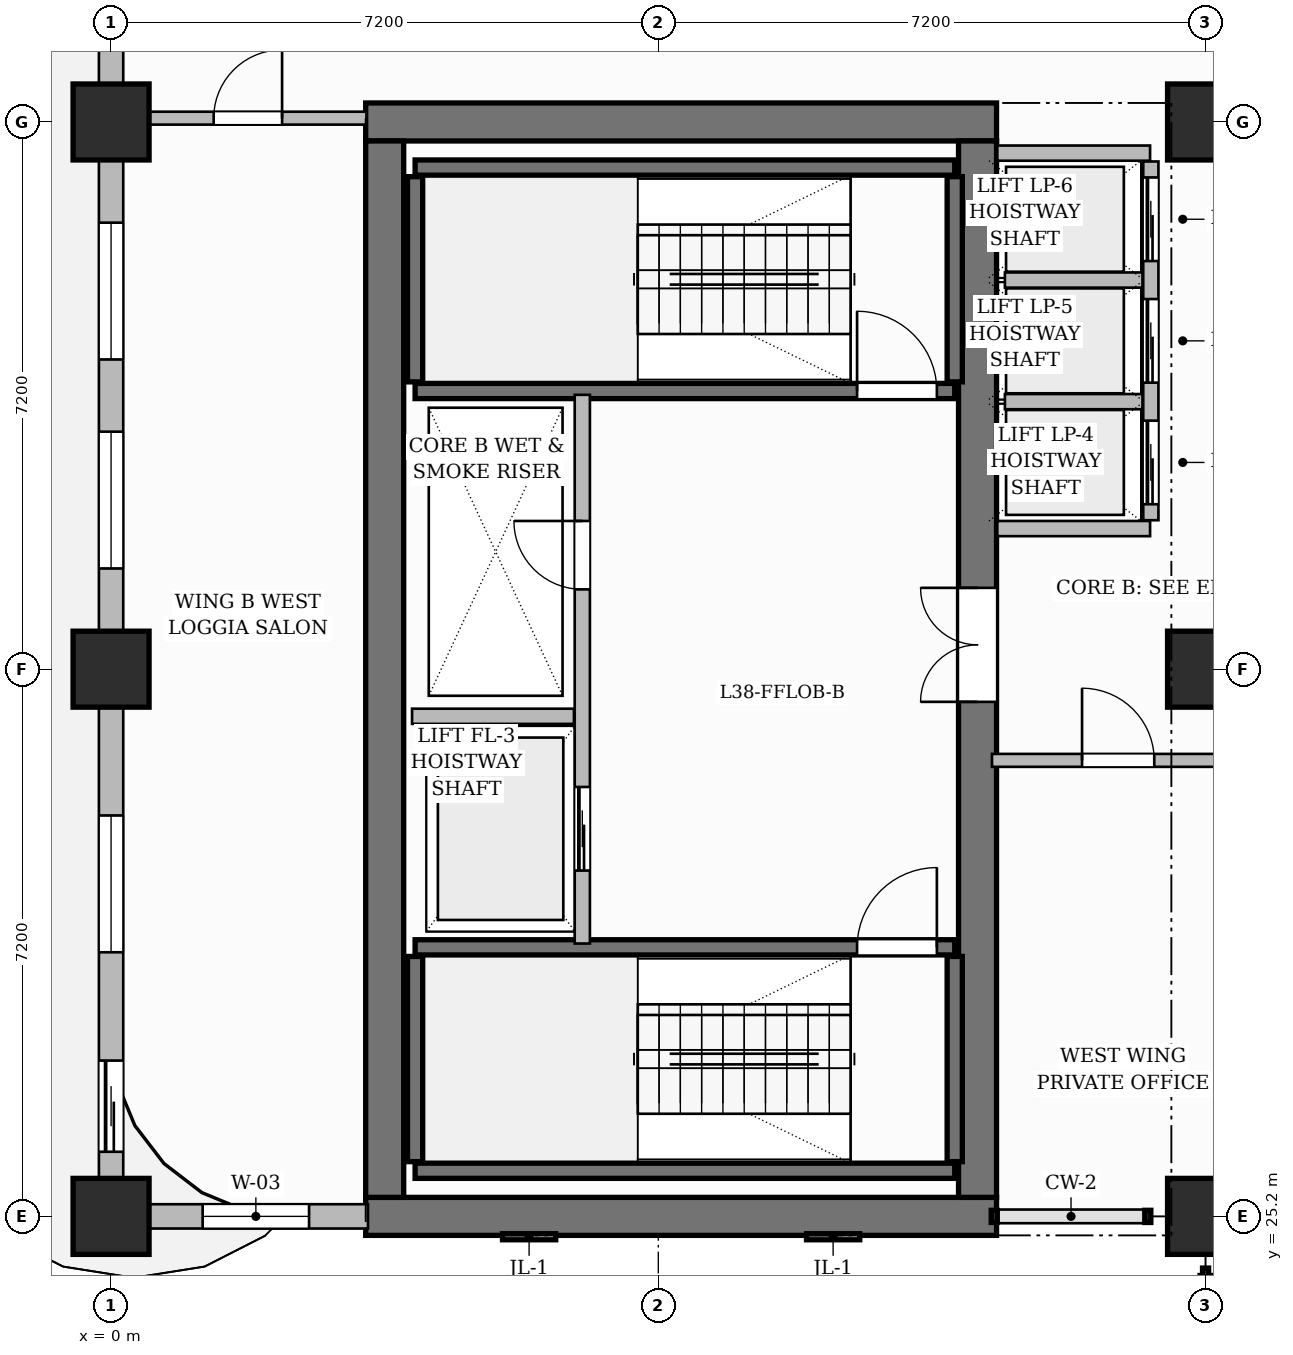
"""IFC4 building model, lengths in metres.
Left out: names, types, materials, properties, quantities, classifications, styles, units other than length and angle.
Written with IfcOpenShell. Run it as: python <this file> out.ifc"""

import sys

from ifc_helpers import new_model, si_unit, direction, frame, frame_2d, origin, origin_2d, place, context, subcontext, project, spatial, rectangle, extrude, source, transform, mapped, element, fill, save


model = new_model("IFC4")
c1 = context("Model", 3, precision=1e-05, world=origin(), true_north=direction((0.0, 1.0)))
c2 = subcontext(c1, "Body", "Model", "MODEL_VIEW")
j1 = project(units=[si_unit("LENGTHUNIT", "METRE"), si_unit("PLANEANGLEUNIT", "RADIAN")], contexts=[c1])
p1 = place(None, origin())
s1 = spatial("IfcSite", under=j1, at=p1, CompositionType="ELEMENT")
p2 = place(p1, origin())
s2 = spatial("IfcBuilding", under=s1, at=p2, CompositionType="ELEMENT")
p3 = place(p2, frame((0.0, 0.0, 154.15)))
s3 = spatial("IfcBuildingStorey", under=s2, at=p3, CompositionType="ELEMENT", Elevation=154.15)
for number, where, z_axis, x_axis in (
    (1, (3.35, 25.2, 0.0), (0.0, 0.0, 1.0), (1.0, 0.0, 0.0)),
    (2, (3.35, 39.6, 0.0), (0.0, 0.0, 1.0), (1.0, 0.0, 0.0)),
):
    element("IfcWall", number, at=place(p3, frame(where, z_axis=z_axis, x_axis=x_axis)), inside=s3, PredefinedType="SHEAR", context=c2, shape_type="SweptSolid", body=[
        extrude(rectangle(XDim=8.3, YDim=0.5, at=frame_2d((4.15, 0.0))), origin(), (0.0, 0.0, 1.0), 3.85),
    ])
p4 = place(p3, frame((3.6, 25.45, 0.0), z_axis=(0.0, 0.0, 1.0), x_axis=(0.0, 1.0, 0.0)))
e3 = element("IfcWall", 3, at=p4, inside=s3, PredefinedType="SHEAR", context=c2, shape_type="SweptSolid", body=[
    extrude(rectangle(XDim=13.9, YDim=0.5, at=frame_2d((6.95, 0.0))), origin(), (0.0, 0.0, 1.0), 3.85),
])
p5 = place(p3, frame((11.4, 25.45, 0.0), z_axis=(0.0, 0.0, 1.0), x_axis=(0.0, 1.0, 0.0)))
e4 = element("IfcWall", 4, at=p5, inside=s3, PredefinedType="SHEAR", context=c2, shape_type="SweptSolid", body=[
    extrude(rectangle(XDim=13.9, YDim=0.5, at=frame_2d((6.95, 0.0))), origin(), (0.0, 0.0, 1.0), 3.85),
])
p6 = place(p5, frame((6.52, 0.0, 0.0)))
e5 = element("IfcOpeningElement", 5, at=p6, cuts=e4, PredefinedType="OPENING", context=c2, shape_type="SweptSolid", body=[
    extrude(rectangle(XDim=1.5, YDim=2.2, at=frame_2d((0.75, 1.1))), frame((0.0, 0.26, 0.0), z_axis=(0.0, -1.0, 0.0), x_axis=(1.0, 0.0, 0.0)), (0.0, 0.0, 1.0), 0.52),
])
m1 = source(origin(), c2, "Body", "SweptSolid", [
    extrude(rectangle(XDim=1.0, YDim=1.0, at=origin_2d()), origin(), (0.0, 0.0, 1.0), 3.85),
])
for number, where, z_axis, x_axis in (
    (6, (0.0, 25.2, 0.0), (0.0, 0.0, 1.0), (1.0, 0.0, 0.0)),
    (7, (0.0, 32.4, 0.0), (0.0, 0.0, 1.0), (1.0, 0.0, 0.0)),
    (8, (0.0, 39.6, 0.0), (0.0, 0.0, 1.0), (1.0, 0.0, 0.0)),
    (9, (14.4, 25.2, 0.0), (0.0, 0.0, 1.0), (1.0, 0.0, 0.0)),
    (10, (14.4, 32.4, 0.0), (0.0, 0.0, 1.0), (1.0, 0.0, 0.0)),
    (11, (14.4, 39.6, 0.0), (0.0, 0.0, 1.0), (1.0, 0.0, 0.0)),
):
    element("IfcColumn", number, at=place(p3, frame(where, z_axis=z_axis, x_axis=x_axis)), inside=s3, PredefinedType="COLUMN", context=c2, shape_type="MappedRepresentation", body=[
        mapped(m1, transform((0.0, 0.0, 0.0), scale=1.0)),
    ])
p7 = place(p3, frame((4.0, 25.8, 0.0), z_axis=(0.0, 0.0, 1.0), x_axis=(1.0, 0.0, 0.0)))
e12 = element("IfcWall", 12, at=p7, inside=s3, PredefinedType="SHEAR", context=c2, shape_type="SweptSolid", body=[
    extrude(rectangle(XDim=7.1, YDim=0.2, at=frame_2d((3.55, 0.0))), origin(), (0.0, 0.0, 1.0), 3.85),
])
for number, where, z_axis, x_axis in (
    (13, (4.0, 25.92, 0.0), (0.0, 0.0, 1.0), (0.0, 1.0, 0.0)),
    (14, (11.1, 25.92, 0.0), (0.0, 0.0, 1.0), (0.0, 1.0, 0.0)),
):
    element("IfcWall", number, at=place(p3, frame(where, z_axis=z_axis, x_axis=x_axis)), inside=s3, PredefinedType="SHEAR", context=c2, shape_type="SweptSolid", body=[
        extrude(rectangle(XDim=2.7, YDim=0.2, at=frame_2d((1.35, 0.0))), origin(), (0.0, 0.0, 1.0), 3.85),
    ])
p8 = place(p3, frame((4.0, 28.74, 0.0), z_axis=(0.0, 0.0, 1.0), x_axis=(1.0, 0.0, 0.0)))
e15 = element("IfcWall", 15, at=p8, inside=s3, PredefinedType="SHEAR", context=c2, shape_type="SweptSolid", body=[
    extrude(rectangle(XDim=7.1, YDim=0.2, at=frame_2d((3.55, 0.0))), origin(), (0.0, 0.0, 1.0), 3.85),
])
p9 = place(p8, frame((5.815, 0.0, 0.0)))
e16 = element("IfcOpeningElement", 16, at=p9, cuts=e15, PredefinedType="OPENING", context=c2, shape_type="SweptSolid", body=[
    extrude(rectangle(XDim=1.05, YDim=2.2, at=frame_2d((0.525, 1.1))), frame((0.0, 0.11, 0.0), z_axis=(0.0, -1.0, 0.0), x_axis=(1.0, 0.0, 0.0)), (0.0, 0.0, 1.0), 0.22),
])
p10 = place(p3, frame((4.0, 39.0, 0.0), z_axis=(0.0, 0.0, 1.0), x_axis=(1.0, 0.0, 0.0)))
e17 = element("IfcWall", 17, at=p10, inside=s3, PredefinedType="SHEAR", context=c2, shape_type="SweptSolid", body=[
    extrude(rectangle(XDim=7.1, YDim=0.2, at=frame_2d((3.55, 0.0))), origin(), (0.0, 0.0, 1.0), 3.85),
])
for number, where, z_axis, x_axis in (
    (18, (4.0, 36.18, 0.0), (0.0, 0.0, 1.0), (0.0, 1.0, 0.0)),
    (19, (11.1, 36.18, 0.0), (0.0, 0.0, 1.0), (0.0, 1.0, 0.0)),
):
    element("IfcWall", number, at=place(p3, frame(where, z_axis=z_axis, x_axis=x_axis)), inside=s3, PredefinedType="SHEAR", context=c2, shape_type="SweptSolid", body=[
        extrude(rectangle(XDim=2.7, YDim=0.2, at=frame_2d((1.35, 0.0))), origin(), (0.0, 0.0, 1.0), 3.85),
    ])
p11 = place(p3, frame((4.0, 36.06, 0.0), z_axis=(0.0, 0.0, 1.0), x_axis=(1.0, 0.0, 0.0)))
e20 = element("IfcWall", 20, at=p11, inside=s3, PredefinedType="SHEAR", context=c2, shape_type="SweptSolid", body=[
    extrude(rectangle(XDim=7.1, YDim=0.2, at=frame_2d((3.55, 0.0))), origin(), (0.0, 0.0, 1.0), 3.85),
])
p12 = place(p11, frame((5.815, 0.0, 0.0)))
e21 = element("IfcOpeningElement", 21, at=p12, cuts=e20, PredefinedType="OPENING", context=c2, shape_type="SweptSolid", body=[
    extrude(rectangle(XDim=1.05, YDim=2.2, at=frame_2d((0.525, 1.1))), frame((0.0, 0.11, 0.0), z_axis=(0.0, -1.0, 0.0), x_axis=(1.0, 0.0, 0.0)), (0.0, 0.0, 1.0), 0.22),
])
p13 = place(p3, frame((6.2, 28.79, 0.0), z_axis=(0.0, 0.0, 1.0), x_axis=(0.0, 1.0, 0.0)))
e22 = element("IfcWall", 22, at=p13, inside=s3, PredefinedType="PARTITIONING", context=c2, shape_type="SweptSolid", body=[
    extrude(rectangle(XDim=7.22, YDim=0.2, at=frame_2d((3.61, 0.0))), origin(), (0.0, 0.0, 1.0), 3.6),
])
p14 = place(p13, frame((4.66, 0.0, 0.0)))
e23 = element("IfcOpeningElement", 23, at=p14, cuts=e22, PredefinedType="OPENING", context=c2, shape_type="SweptSolid", body=[
    extrude(rectangle(XDim=0.9, YDim=2.1, at=frame_2d((0.45, 1.05))), frame((0.0, 0.11, 0.0), z_axis=(0.0, -1.0, 0.0), x_axis=(1.0, 0.0, 0.0)), (0.0, 0.0, 1.0), 0.22),
])
p15 = place(p13, frame((0.96, 0.0, 0.0)))
e24 = element("IfcOpeningElement", 24, at=p15, cuts=e22, PredefinedType="OPENING", context=c2, shape_type="SweptSolid", body=[
    extrude(rectangle(XDim=1.1, YDim=2.2, at=frame_2d((0.55, 1.1))), frame((0.0, 0.11, 0.0), z_axis=(0.0, -1.0, 0.0), x_axis=(1.0, 0.0, 0.0)), (0.0, 0.0, 1.0), 0.22),
])
p16 = place(p3, frame((3.96, 31.78, 0.0), z_axis=(0.0, 0.0, 1.0), x_axis=(1.0, 0.0, 0.0)))
e25 = element("IfcWall", 25, at=p16, inside=s3, PredefinedType="PARTITIONING", context=c2, shape_type="SweptSolid", body=[
    extrude(rectangle(XDim=2.13, YDim=0.2, at=frame_2d((1.065, 0.0))), origin(), (0.0, 0.0, 1.0), 3.6),
])
for number, where, z_axis, x_axis in (
    (26, (11.66, 34.25, 0.0), (0.0, 0.0, 1.0), (1.0, 0.0, 0.0)),
    (27, (11.66, 39.19, 0.0), (0.0, 0.0, 1.0), (1.0, 0.0, 0.0)),
):
    element("IfcWall", number, at=place(p3, frame(where, z_axis=z_axis, x_axis=x_axis)), inside=s3, PredefinedType="PARTITIONING", context=c2, shape_type="SweptSolid", body=[
        extrude(rectangle(XDim=2.01, YDim=0.2, at=frame_2d((1.005, 0.0))), origin(), (0.0, 0.0, 1.0), 3.6),
    ])
p17 = place(p3, frame((13.68, 34.36, 0.0), z_axis=(0.0, 0.0, 1.0), x_axis=(0.0, 1.0, 0.0)))
e28 = element("IfcWall", 28, at=p17, inside=s3, PredefinedType="PARTITIONING", context=c2, shape_type="SweptSolid", body=[
    extrude(rectangle(XDim=4.72, YDim=0.2, at=frame_2d((2.36, 0.0))), origin(), (0.0, 0.0, 1.0), 3.6),
])
p18 = place(p17, frame((0.21, 0.0, 0.0)))
e29 = element("IfcOpeningElement", 29, at=p18, cuts=e28, PredefinedType="OPENING", context=c2, shape_type="SweptSolid", body=[
    extrude(rectangle(XDim=1.1, YDim=2.2, at=frame_2d((0.55, 1.1))), frame((0.0, 0.11, 0.0), z_axis=(0.0, -1.0, 0.0), x_axis=(1.0, 0.0, 0.0)), (0.0, 0.0, 1.0), 0.22),
])
p19 = place(p17, frame((1.81, 0.0, 0.0)))
e30 = element("IfcOpeningElement", 30, at=p19, cuts=e28, PredefinedType="OPENING", context=c2, shape_type="SweptSolid", body=[
    extrude(rectangle(XDim=1.1, YDim=2.2, at=frame_2d((0.55, 1.1))), frame((0.0, 0.11, 0.0), z_axis=(0.0, -1.0, 0.0), x_axis=(1.0, 0.0, 0.0)), (0.0, 0.0, 1.0), 0.22),
])
p20 = place(p17, frame((3.41, 0.0, 0.0)))
e31 = element("IfcOpeningElement", 31, at=p20, cuts=e28, PredefinedType="OPENING", context=c2, shape_type="SweptSolid", body=[
    extrude(rectangle(XDim=1.1, YDim=2.2, at=frame_2d((0.55, 1.1))), frame((0.0, 0.11, 0.0), z_axis=(0.0, -1.0, 0.0), x_axis=(1.0, 0.0, 0.0)), (0.0, 0.0, 1.0), 0.22),
])
for number, where, z_axis, x_axis in (
    (32, (11.76, 35.92, 0.0), (0.0, 0.0, 1.0), (1.0, 0.0, 0.0)),
    (33, (11.76, 37.52, 0.0), (0.0, 0.0, 1.0), (1.0, 0.0, 0.0)),
):
    element("IfcWall", number, at=place(p3, frame(where, z_axis=z_axis, x_axis=x_axis)), inside=s3, PredefinedType="PARTITIONING", context=c2, shape_type="SweptSolid", body=[
        extrude(rectangle(XDim=1.81, YDim=0.2, at=frame_2d((0.905, 0.0))), origin(), (0.0, 0.0, 1.0), 3.6),
    ])
p21 = place(p3, frame((0.24, 39.65, 0.0), z_axis=(0.0, 0.0, 1.0), x_axis=(1.0, 0.0, 0.0)))
e34 = element("IfcWall", 34, at=p21, inside=s3, PredefinedType="PARTITIONING", context=c2, shape_type="SweptSolid", body=[
    extrude(rectangle(XDim=3.12, YDim=0.17, at=frame_2d((1.56, 0.0))), origin(), (0.0, 0.0, 1.0), 3.6),
])
p22 = place(p21, frame((1.11, 0.0, 0.0)))
e35 = element("IfcOpeningElement", 35, at=p22, cuts=e34, PredefinedType="OPENING", context=c2, shape_type="SweptSolid", body=[
    extrude(rectangle(XDim=0.9, YDim=2.15, at=frame_2d((0.45, 1.075))), frame((0.0, 0.095, 0.0), z_axis=(0.0, -1.0, 0.0), x_axis=(1.0, 0.0, 0.0)), (0.0, 0.0, 1.0), 0.19),
])
p23 = place(p3, frame((11.59, 31.2, 0.0), z_axis=(0.0, 0.0, 1.0), x_axis=(1.0, 0.0, 0.0)))
e36 = element("IfcWall", 36, at=p23, inside=s3, PredefinedType="PARTITIONING", context=c2, shape_type="SweptSolid", body=[
    extrude(rectangle(XDim=3.37, YDim=0.17, at=frame_2d((1.685, 0.0))), origin(), (0.0, 0.0, 1.0), 3.6),
])
p24 = place(p23, frame((1.185, 0.0, 0.0)))
e37 = element("IfcOpeningElement", 37, at=p24, cuts=e36, PredefinedType="OPENING", context=c2, shape_type="SweptSolid", body=[
    extrude(rectangle(XDim=0.95, YDim=2.15, at=frame_2d((0.475, 1.075))), frame((0.0, 0.095, 0.0), z_axis=(0.0, -1.0, 0.0), x_axis=(1.0, 0.0, 0.0)), (0.0, 0.0, 1.0), 0.19),
])
p25 = place(p3, frame((0.0, 25.2, 0.0), z_axis=(0.0, 0.0, 1.0), x_axis=(1.0, 0.0, 0.0)))
e38 = element("IfcWall", 38, at=p25, inside=s3, PredefinedType="SOLIDWALL", context=c2, shape_type="SweptSolid", body=[
    extrude(rectangle(XDim=3.38, YDim=0.32, at=frame_2d((1.69, 0.0))), origin(), (0.0, 0.0, 1.0), 3.6),
])
p26 = place(p25, frame((1.205, 0.0, 0.8)))
e39 = element("IfcOpeningElement", 39, at=p26, cuts=e38, PredefinedType="OPENING", context=c2, shape_type="SweptSolid", body=[
    extrude(rectangle(XDim=1.4, YDim=1.85, at=frame_2d((0.7, 0.925))), frame((0.0, 0.17, 0.0), z_axis=(0.0, -1.0, 0.0), x_axis=(1.0, 0.0, 0.0)), (0.0, 0.0, 1.0), 0.34),
])
p27 = place(p3, frame((0.0, 25.25, 0.0), z_axis=(0.0, 0.0, 1.0), x_axis=(0.0, 1.0, 0.0)))
e40 = element("IfcWall", 40, at=p27, inside=s3, PredefinedType="SOLIDWALL", context=c2, shape_type="SweptSolid", body=[
    extrude(rectangle(XDim=21.5, YDim=0.32, at=frame_2d((10.75, 0.0))), origin(), (0.0, 0.0, 1.0), 3.085),
])
p28 = place(p27, frame((18.45, 0.0, 0.0)))
e41 = element("IfcOpeningElement", 41, at=p28, cuts=e40, PredefinedType="OPENING", context=c2, shape_type="SweptSolid", body=[
    extrude(rectangle(XDim=1.2, YDim=2.2, at=frame_2d((0.6, 1.1))), frame((0.0, 0.17, 0.0), z_axis=(0.0, -1.0, 0.0), x_axis=(1.0, 0.0, 0.0)), (0.0, 0.0, 1.0), 0.34),
])
p29 = place(p27, frame((0.8, 0.0, 0.0)))
e42 = element("IfcOpeningElement", 42, at=p29, cuts=e40, PredefinedType="OPENING", context=c2, shape_type="SweptSolid", body=[
    extrude(rectangle(XDim=1.2, YDim=2.2, at=frame_2d((0.6, 1.1))), frame((0.0, 0.17, 0.0), z_axis=(0.0, -1.0, 0.0), x_axis=(1.0, 0.0, 0.0)), (0.0, 0.0, 1.0), 0.34),
])
p30 = place(p27, frame((3.425, 0.0, 0.8)))
e43 = element("IfcOpeningElement", 43, at=p30, cuts=e40, PredefinedType="OPENING", context=c2, shape_type="SweptSolid", body=[
    extrude(rectangle(XDim=1.8, YDim=1.85, at=frame_2d((0.9, 0.925))), frame((0.0, 0.17, 0.0), z_axis=(0.0, -1.0, 0.0), x_axis=(1.0, 0.0, 0.0)), (0.0, 0.0, 1.0), 0.34),
])
p31 = place(p27, frame((8.475, 0.0, 0.8)))
e44 = element("IfcOpeningElement", 44, at=p31, cuts=e40, PredefinedType="OPENING", context=c2, shape_type="SweptSolid", body=[
    extrude(rectangle(XDim=1.8, YDim=1.85, at=frame_2d((0.9, 0.925))), frame((0.0, 0.17, 0.0), z_axis=(0.0, -1.0, 0.0), x_axis=(1.0, 0.0, 0.0)), (0.0, 0.0, 1.0), 0.34),
])
p32 = place(p27, frame((11.225, 0.0, 0.8)))
e45 = element("IfcOpeningElement", 45, at=p32, cuts=e40, PredefinedType="OPENING", context=c2, shape_type="SweptSolid", body=[
    extrude(rectangle(XDim=1.8, YDim=1.85, at=frame_2d((0.9, 0.925))), frame((0.0, 0.17, 0.0), z_axis=(0.0, -1.0, 0.0), x_axis=(1.0, 0.0, 0.0)), (0.0, 0.0, 1.0), 0.34),
])
p33 = place(p27, frame((15.75, 0.0, 0.8)))
e46 = element("IfcOpeningElement", 46, at=p33, cuts=e40, PredefinedType="OPENING", context=c2, shape_type="SweptSolid", body=[
    extrude(rectangle(XDim=1.8, YDim=1.85, at=frame_2d((0.9, 0.925))), frame((0.0, 0.17, 0.0), z_axis=(0.0, -1.0, 0.0), x_axis=(1.0, 0.0, 0.0)), (0.0, 0.0, 1.0), 0.34),
])
m2 = source(origin(), c2, "Body", "SweptSolid", [
    extrude(rectangle(XDim=1.05, YDim=2.2, at=frame_2d((0.525, 1.1))), frame((0.0, 0.025, 0.0), z_axis=(0.0, -1.0, 0.0), x_axis=(1.0, 0.0, 0.0)), (0.0, 0.0, 1.0), 0.05),
])
p34 = place(p9, origin())
e47 = element("IfcDoor", 47, at=p34, inside=s3, OperationType="SINGLE_SWING_RIGHT", PredefinedType="DOOR", context=c2, shape_type="MappedRepresentation", body=[
    mapped(m2, transform((0.0, 0.0, 0.0), scale=1.0)),
])
fill(e16, e47)
p35 = place(p12, origin())
e48 = element("IfcDoor", 48, at=p35, inside=s3, OperationType="SINGLE_SWING_LEFT", PredefinedType="DOOR", context=c2, shape_type="MappedRepresentation", body=[
    mapped(m2, transform((0.0, 0.0, 0.0), scale=1.0)),
])
fill(e21, e48)
m3 = source(origin(), c2, "Body", "SweptSolid", [
    extrude(rectangle(XDim=0.9, YDim=2.1, at=frame_2d((0.45, 1.05))), frame((0.0, 0.025, 0.0), z_axis=(0.0, -1.0, 0.0), x_axis=(1.0, 0.0, 0.0)), (0.0, 0.0, 1.0), 0.05),
])
p36 = place(p14, origin())
e49 = element("IfcDoor", 49, at=p36, inside=s3, OperationType="SINGLE_SWING_RIGHT", PredefinedType="DOOR", context=c2, shape_type="MappedRepresentation", body=[
    mapped(m3, transform((0.0, 0.0, 0.0), scale=1.0)),
])
fill(e23, e49)
m4 = source(origin(), c2, "Body", "SweptSolid", [
    extrude(rectangle(XDim=1.5, YDim=2.2, at=frame_2d((0.75, 1.1))), frame((0.0, 0.025, 0.0), z_axis=(0.0, -1.0, 0.0), x_axis=(1.0, 0.0, 0.0)), (0.0, 0.0, 1.0), 0.05),
])
p37 = place(p6, origin())
e50 = element("IfcDoor", 50, at=p37, inside=s3, OperationType="DOUBLE_DOOR_SINGLE_SWING", PredefinedType="DOOR", context=c2, shape_type="MappedRepresentation", body=[
    mapped(m4, transform((0.0, 0.0, 0.0), scale=1.0)),
])
fill(e5, e50)
m5 = source(origin(), c2, "Body", "SweptSolid", [
    extrude(rectangle(XDim=0.9, YDim=2.15, at=frame_2d((0.45, 1.075))), frame((0.0, 0.025, 0.0), z_axis=(0.0, -1.0, 0.0), x_axis=(1.0, 0.0, 0.0)), (0.0, 0.0, 1.0), 0.05),
])
p38 = place(p22, origin())
e51 = element("IfcDoor", 51, at=p38, inside=s3, OperationType="SINGLE_SWING_RIGHT", PredefinedType="DOOR", context=c2, shape_type="MappedRepresentation", body=[
    mapped(m5, transform((0.0, 0.0, 0.0), scale=1.0)),
])
fill(e35, e51)
m6 = source(origin(), c2, "Body", "SweptSolid", [
    extrude(rectangle(XDim=0.95, YDim=2.15, at=frame_2d((0.475, 1.075))), frame((0.0, 0.025, 0.0), z_axis=(0.0, -1.0, 0.0), x_axis=(1.0, 0.0, 0.0)), (0.0, 0.0, 1.0), 0.05),
])
p39 = place(p24, origin())
e52 = element("IfcDoor", 52, at=p39, inside=s3, OperationType="SINGLE_SWING_LEFT", PredefinedType="DOOR", context=c2, shape_type="MappedRepresentation", body=[
    mapped(m6, transform((0.0, 0.0, 0.0), scale=1.0)),
])
fill(e37, e52)
m7 = source(origin(), c2, "Body", "SweptSolid", [
    extrude(rectangle(XDim=1.1, YDim=2.2, at=frame_2d((0.55, 1.1))), frame((0.0, 0.025, 0.0), z_axis=(0.0, -1.0, 0.0), x_axis=(1.0, 0.0, 0.0)), (0.0, 0.0, 1.0), 0.05),
])
p40 = place(p15, origin())
e53 = element("IfcDoor", 53, at=p40, inside=s3, OperationType="SLIDING_TO_LEFT", PredefinedType="DOOR", context=c2, shape_type="MappedRepresentation", body=[
    mapped(m7, transform((0.0, 0.0, 0.0), scale=1.0)),
])
fill(e24, e53)
p41 = place(p18, origin())
e54 = element("IfcDoor", 54, at=p41, inside=s3, OperationType="SLIDING_TO_LEFT", PredefinedType="DOOR", context=c2, shape_type="MappedRepresentation", body=[
    mapped(m7, transform((0.0, 0.0, 0.0), scale=1.0)),
])
fill(e29, e54)
p42 = place(p19, origin())
e55 = element("IfcDoor", 55, at=p42, inside=s3, OperationType="SLIDING_TO_LEFT", PredefinedType="DOOR", context=c2, shape_type="MappedRepresentation", body=[
    mapped(m7, transform((0.0, 0.0, 0.0), scale=1.0)),
])
fill(e30, e55)
p43 = place(p20, origin())
e56 = element("IfcDoor", 56, at=p43, inside=s3, OperationType="SLIDING_TO_LEFT", PredefinedType="DOOR", context=c2, shape_type="MappedRepresentation", body=[
    mapped(m7, transform((0.0, 0.0, 0.0), scale=1.0)),
])
fill(e31, e56)
m8 = source(origin(), c2, "Body", "SweptSolid", [
    extrude(rectangle(XDim=1.2, YDim=2.2, at=frame_2d((0.6, 1.1))), frame((0.0, 0.025, 0.0), z_axis=(0.0, -1.0, 0.0), x_axis=(1.0, 0.0, 0.0)), (0.0, 0.0, 1.0), 0.05),
])
p44 = place(p29, origin())
e57 = element("IfcDoor", 57, at=p44, inside=s3, OperationType="SLIDING_TO_LEFT", PredefinedType="DOOR", context=c2, shape_type="MappedRepresentation", body=[
    mapped(m8, transform((0.0, 0.0, 0.0), scale=1.0)),
])
fill(e42, e57)
m9 = source(origin(), c2, "Body", "SweptSolid", [
    extrude(rectangle(XDim=1.4, YDim=1.85, at=frame_2d((0.7, 0.925))), frame((0.0, 0.03, 0.0), z_axis=(0.0, -1.0, 0.0), x_axis=(1.0, 0.0, 0.0)), (0.0, 0.0, 1.0), 0.06),
])
p45 = place(p26, origin())
e58 = element("IfcWindow", 58, at=p45, inside=s3, PartitioningType="SINGLE_PANEL", PredefinedType="WINDOW", context=c2, shape_type="MappedRepresentation", body=[
    mapped(m9, transform((0.0, 0.0, 0.0), scale=1.0)),
])
fill(e39, e58)
m10 = source(origin(), c2, "Body", "SweptSolid", [
    extrude(rectangle(XDim=1.8, YDim=1.85, at=frame_2d((0.9, 0.925))), frame((0.0, 0.03, 0.0), z_axis=(0.0, -1.0, 0.0), x_axis=(1.0, 0.0, 0.0)), (0.0, 0.0, 1.0), 0.06),
])
p46 = place(p30, origin())
e59 = element("IfcWindow", 59, at=p46, inside=s3, PartitioningType="DOUBLE_PANEL_VERTICAL", PredefinedType="WINDOW", context=c2, shape_type="MappedRepresentation", body=[
    mapped(m10, transform((0.0, 0.0, 0.0), scale=1.0)),
])
fill(e43, e59)
p47 = place(p31, origin())
e60 = element("IfcWindow", 60, at=p47, inside=s3, PartitioningType="DOUBLE_PANEL_VERTICAL", PredefinedType="WINDOW", context=c2, shape_type="MappedRepresentation", body=[
    mapped(m10, transform((0.0, 0.0, 0.0), scale=1.0)),
])
fill(e44, e60)
p48 = place(p32, origin())
e61 = element("IfcWindow", 61, at=p48, inside=s3, PartitioningType="DOUBLE_PANEL_VERTICAL", PredefinedType="WINDOW", context=c2, shape_type="MappedRepresentation", body=[
    mapped(m10, transform((0.0, 0.0, 0.0), scale=1.0)),
])
fill(e45, e61)
save(model, sys.argv[1])
